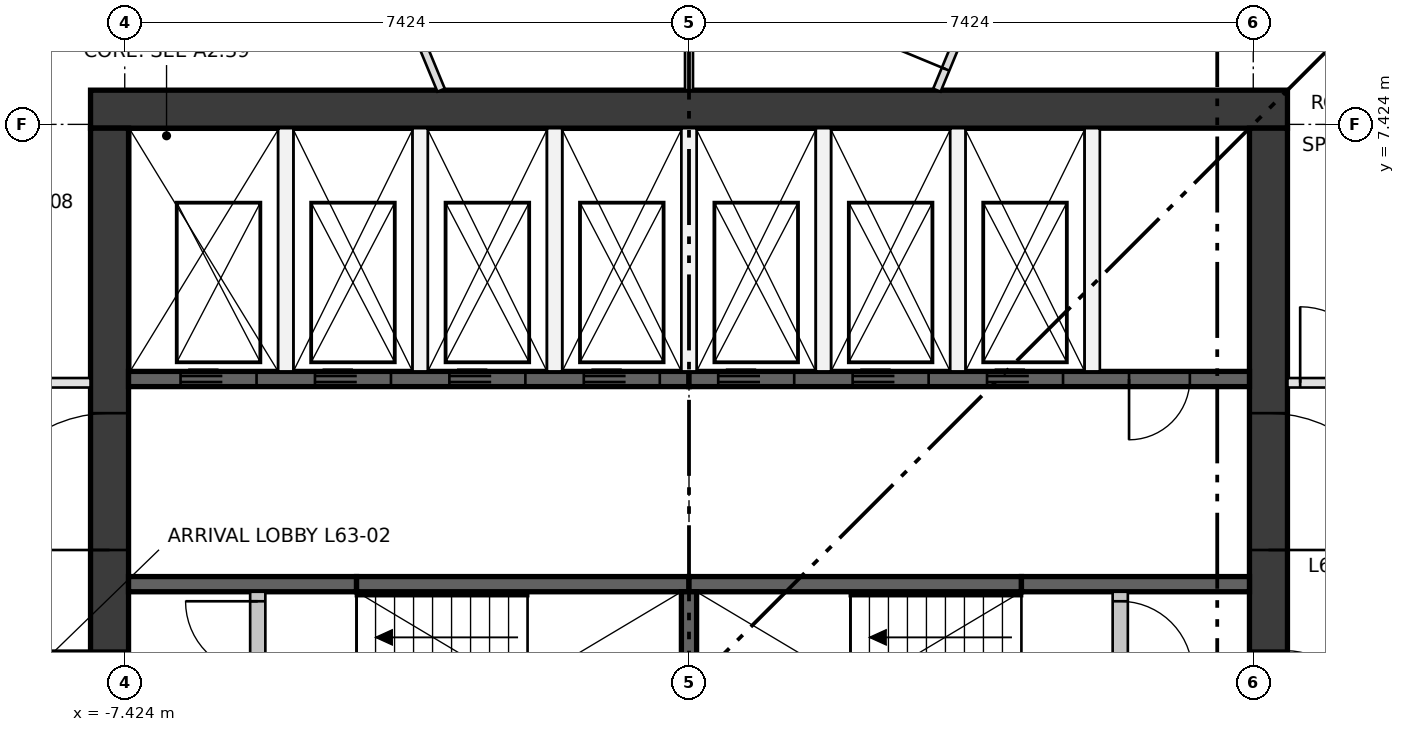
"""IFC4 building model, lengths in metres.
Left out: names, types, materials, properties, quantities, classifications, styles, units other than length and angle.
Written with IfcOpenShell. Run it as: python <this file> out.ifc"""

import sys

from ifc_helpers import new_model, si_unit, direction, frame, frame_2d, origin, place, context, subcontext, project, spatial, rectangle, extrude, element, fill, save


model = new_model("IFC4")
c1 = context("Model", 3, precision=1e-05, world=origin(), true_north=direction((0.0, 1.0)))
c2 = subcontext(c1, "Body", "Model", "MODEL_VIEW")
j1 = project(units=[si_unit("LENGTHUNIT", "METRE"), si_unit("PLANEANGLEUNIT", "RADIAN")], contexts=[c1])
p1 = place(None, origin())
s1 = spatial("IfcSite", under=j1, at=p1, CompositionType="ELEMENT")
p2 = place(p1, origin())
s2 = spatial("IfcBuilding", under=s1, at=p2, CompositionType="ELEMENT")
p3 = place(p2, frame((0.0, 0.0, 231.2)))
s3 = spatial("IfcBuildingStorey", under=s2, at=p3, CompositionType="ELEMENT", Elevation=231.2)
p4 = place(p3, frame((-7.874, 7.624, 0.0), z_axis=(0.0, 0.0, 1.0), x_axis=(1.0, 0.0, 0.0)))
e1 = element("IfcWall", 1, at=p4, inside=s3, PredefinedType="SHEAR", context=c2, shape_type="SweptSolid", body=[
    extrude(rectangle(XDim=15.748, YDim=0.5, at=frame_2d((7.874, 0.0))), origin(), (0.0, 0.0, 1.0), 3.3),
])
p5 = place(p3, frame((-7.624, -7.374, 0.0), z_axis=(0.0, 0.0, 1.0), x_axis=(0.0, 1.0, 0.0)))
e2 = element("IfcWall", 2, at=p5, inside=s3, PredefinedType="SHEAR", context=c2, shape_type="SweptSolid", body=[
    extrude(rectangle(XDim=14.748, YDim=0.5, at=frame_2d((7.374, 0.0))), origin(), (0.0, 0.0, 1.0), 3.3),
])
p6 = place(p5, frame((6.874, 0.0, 0.0)))
e3 = element("IfcOpeningElement", 3, at=p6, cuts=e2, PredefinedType="OPENING", context=c2, shape_type="SweptSolid", body=[
    extrude(rectangle(XDim=1.0, YDim=2.1, at=frame_2d((0.5, 1.05))), frame((0.0, 0.26, 0.0), z_axis=(0.0, -1.0, 0.0), x_axis=(1.0, 0.0, 0.0)), (0.0, 0.0, 1.0), 0.52),
])
p7 = place(p5, frame((3.75, 0.0, 0.0)))
e4 = element("IfcOpeningElement", 4, at=p7, cuts=e2, PredefinedType="OPENING", context=c2, shape_type="SweptSolid", body=[
    extrude(rectangle(XDim=1.8, YDim=2.1, at=frame_2d((0.9, 1.05))), frame((0.0, 0.26, 0.0), z_axis=(0.0, -1.0, 0.0), x_axis=(1.0, 0.0, 0.0)), (0.0, 0.0, 1.0), 0.52),
])
p8 = place(p5, frame((9.198, 0.0, 0.0)))
e5 = element("IfcOpeningElement", 5, at=p8, cuts=e2, PredefinedType="OPENING", context=c2, shape_type="SweptSolid", body=[
    extrude(rectangle(XDim=1.8, YDim=2.1, at=frame_2d((0.9, 1.05))), frame((0.0, 0.26, 0.0), z_axis=(0.0, -1.0, 0.0), x_axis=(1.0, 0.0, 0.0)), (0.0, 0.0, 1.0), 0.52),
])
p9 = place(p3, frame((7.624, -7.374, 0.0), z_axis=(0.0, 0.0, 1.0), x_axis=(0.0, 1.0, 0.0)))
e6 = element("IfcWall", 6, at=p9, inside=s3, PredefinedType="SHEAR", context=c2, shape_type="SweptSolid", body=[
    extrude(rectangle(XDim=14.748, YDim=0.5, at=frame_2d((7.374, 0.0))), origin(), (0.0, 0.0, 1.0), 3.3),
])
p10 = place(p9, frame((6.874, 0.0, 0.0)))
e7 = element("IfcOpeningElement", 7, at=p10, cuts=e6, PredefinedType="OPENING", context=c2, shape_type="SweptSolid", body=[
    extrude(rectangle(XDim=1.0, YDim=2.1, at=frame_2d((0.5, 1.05))), frame((0.0, 0.26, 0.0), z_axis=(0.0, -1.0, 0.0), x_axis=(1.0, 0.0, 0.0)), (0.0, 0.0, 1.0), 0.52),
])
p11 = place(p9, frame((3.75, 0.0, 0.0)))
e8 = element("IfcOpeningElement", 8, at=p11, cuts=e6, PredefinedType="OPENING", context=c2, shape_type="SweptSolid", body=[
    extrude(rectangle(XDim=1.8, YDim=2.1, at=frame_2d((0.9, 1.05))), frame((0.0, 0.26, 0.0), z_axis=(0.0, -1.0, 0.0), x_axis=(1.0, 0.0, 0.0)), (0.0, 0.0, 1.0), 0.52),
])
p12 = place(p9, frame((9.198, 0.0, 0.0)))
e9 = element("IfcOpeningElement", 9, at=p12, cuts=e6, PredefinedType="OPENING", context=c2, shape_type="SweptSolid", body=[
    extrude(rectangle(XDim=1.8, YDim=2.1, at=frame_2d((0.9, 1.05))), frame((0.0, 0.26, 0.0), z_axis=(0.0, -1.0, 0.0), x_axis=(1.0, 0.0, 0.0)), (0.0, 0.0, 1.0), 0.52),
])
p13 = place(p3, frame((-7.374, 4.074, 0.0), z_axis=(0.0, 0.0, 1.0), x_axis=(1.0, 0.0, 0.0)))
e10 = element("IfcWall", 10, at=p13, inside=s3, PredefinedType="SHEAR", context=c2, shape_type="SweptSolid", body=[
    extrude(rectangle(XDim=7.374, YDim=0.2, at=frame_2d((3.687, 0.0))), origin(), (0.0, 0.0, 1.0), 3.3),
])
p14 = place(p13, frame((0.684, 0.0, 0.0)))
e11 = element("IfcOpeningElement", 11, at=p14, cuts=e10, PredefinedType="OPENING", context=c2, shape_type="SweptSolid", body=[
    extrude(rectangle(XDim=1.0, YDim=2.1, at=frame_2d((0.5, 1.05))), frame((0.0, 0.11, 0.0), z_axis=(0.0, -1.0, 0.0), x_axis=(1.0, 0.0, 0.0)), (0.0, 0.0, 1.0), 0.22),
])
p15 = place(p13, frame((2.453, 0.0, 0.0)))
e12 = element("IfcOpeningElement", 12, at=p15, cuts=e10, PredefinedType="OPENING", context=c2, shape_type="SweptSolid", body=[
    extrude(rectangle(XDim=1.0, YDim=2.1, at=frame_2d((0.5, 1.05))), frame((0.0, 0.11, 0.0), z_axis=(0.0, -1.0, 0.0), x_axis=(1.0, 0.0, 0.0)), (0.0, 0.0, 1.0), 0.22),
])
p16 = place(p13, frame((4.221, 0.0, 0.0)))
e13 = element("IfcOpeningElement", 13, at=p16, cuts=e10, PredefinedType="OPENING", context=c2, shape_type="SweptSolid", body=[
    extrude(rectangle(XDim=1.0, YDim=2.1, at=frame_2d((0.5, 1.05))), frame((0.0, 0.11, 0.0), z_axis=(0.0, -1.0, 0.0), x_axis=(1.0, 0.0, 0.0)), (0.0, 0.0, 1.0), 0.22),
])
p17 = place(p13, frame((5.99, 0.0, 0.0)))
e14 = element("IfcOpeningElement", 14, at=p17, cuts=e10, PredefinedType="OPENING", context=c2, shape_type="SweptSolid", body=[
    extrude(rectangle(XDim=1.0, YDim=2.1, at=frame_2d((0.5, 1.05))), frame((0.0, 0.11, 0.0), z_axis=(0.0, -1.0, 0.0), x_axis=(1.0, 0.0, 0.0)), (0.0, 0.0, 1.0), 0.22),
])
p18 = place(p3, frame((0.0, 4.074, 0.0), z_axis=(0.0, 0.0, 1.0), x_axis=(1.0, 0.0, 0.0)))
e15 = element("IfcWall", 15, at=p18, inside=s3, PredefinedType="SHEAR", context=c2, shape_type="SweptSolid", body=[
    extrude(rectangle(XDim=7.374, YDim=0.2, at=frame_2d((3.687, 0.0))), origin(), (0.0, 0.0, 1.0), 3.3),
])
p19 = place(p18, frame((0.384, 0.0, 0.0)))
e16 = element("IfcOpeningElement", 16, at=p19, cuts=e15, PredefinedType="OPENING", context=c2, shape_type="SweptSolid", body=[
    extrude(rectangle(XDim=1.0, YDim=2.1, at=frame_2d((0.5, 1.05))), frame((0.0, 0.11, 0.0), z_axis=(0.0, -1.0, 0.0), x_axis=(1.0, 0.0, 0.0)), (0.0, 0.0, 1.0), 0.22),
])
p20 = place(p18, frame((2.153, 0.0, 0.0)))
e17 = element("IfcOpeningElement", 17, at=p20, cuts=e15, PredefinedType="OPENING", context=c2, shape_type="SweptSolid", body=[
    extrude(rectangle(XDim=1.0, YDim=2.1, at=frame_2d((0.5, 1.05))), frame((0.0, 0.11, 0.0), z_axis=(0.0, -1.0, 0.0), x_axis=(1.0, 0.0, 0.0)), (0.0, 0.0, 1.0), 0.22),
])
p21 = place(p18, frame((3.921, 0.0, 0.0)))
e18 = element("IfcOpeningElement", 18, at=p21, cuts=e15, PredefinedType="OPENING", context=c2, shape_type="SweptSolid", body=[
    extrude(rectangle(XDim=1.0, YDim=2.1, at=frame_2d((0.5, 1.05))), frame((0.0, 0.11, 0.0), z_axis=(0.0, -1.0, 0.0), x_axis=(1.0, 0.0, 0.0)), (0.0, 0.0, 1.0), 0.22),
])
p22 = place(p18, frame((5.79, 0.0, 0.0)))
e19 = element("IfcOpeningElement", 19, at=p22, cuts=e15, PredefinedType="OPENING", context=c2, shape_type="SweptSolid", body=[
    extrude(rectangle(XDim=0.8, YDim=2.1, at=frame_2d((0.4, 1.05))), frame((0.0, 0.11, 0.0), z_axis=(0.0, -1.0, 0.0), x_axis=(1.0, 0.0, 0.0)), (0.0, 0.0, 1.0), 0.22),
])
p23 = place(p3, frame((-7.374, 1.375, 0.0), z_axis=(0.0, 0.0, 1.0), x_axis=(1.0, 0.0, 0.0)))
e20 = element("IfcWall", 20, at=p23, inside=s3, PredefinedType="SHEAR", context=c2, shape_type="SweptSolid", body=[
    extrude(rectangle(XDim=3.0, YDim=0.2, at=frame_2d((1.5, 0.0))), origin(), (0.0, 0.0, 1.0), 3.3),
])
for number, where, z_axis, x_axis in (
    (21, (-4.374, 1.375, 0.0), (0.0, 0.0, 1.0), (1.0, 0.0, 0.0)),
    (22, (0.0, 1.375, 0.0), (0.0, 0.0, 1.0), (1.0, 0.0, 0.0)),
):
    element("IfcWall", number, at=place(p3, frame(where, z_axis=z_axis, x_axis=x_axis)), inside=s3, PredefinedType="SHEAR", context=c2, shape_type="SweptSolid", body=[
        extrude(rectangle(XDim=4.374, YDim=0.2, at=frame_2d((2.187, 0.0))), origin(), (0.0, 0.0, 1.0), 3.3),
    ])
p24 = place(p3, frame((4.374, 1.375, 0.0), z_axis=(0.0, 0.0, 1.0), x_axis=(1.0, 0.0, 0.0)))
e23 = element("IfcWall", 23, at=p24, inside=s3, PredefinedType="SHEAR", context=c2, shape_type="SweptSolid", body=[
    extrude(rectangle(XDim=3.0, YDim=0.2, at=frame_2d((1.5, 0.0))), origin(), (0.0, 0.0, 1.0), 3.3),
])
p25 = place(p3, frame((0.0, -1.275, 0.0), z_axis=(0.0, 0.0, 1.0), x_axis=(0.0, 1.0, 0.0)))
e24 = element("IfcWall", 24, at=p25, inside=s3, PredefinedType="SHEAR", context=c2, shape_type="SweptSolid", body=[
    extrude(rectangle(XDim=2.55, YDim=0.2, at=frame_2d((1.275, 0.0))), origin(), (0.0, 0.0, 1.0), 3.3),
])
for number, where, z_axis, x_axis in (
    (25, (-5.305, 4.174, 0.0), (0.0, 0.0, 1.0), (0.0, 1.0, 0.0)),
    (26, (-3.537, 4.174, 0.0), (0.0, 0.0, 1.0), (0.0, 1.0, 0.0)),
    (27, (-1.769, 4.174, 0.0), (0.0, 0.0, 1.0), (0.0, 1.0, 0.0)),
    (28, (0.0, 4.174, 0.0), (0.0, 0.0, 1.0), (0.0, 1.0, 0.0)),
    (29, (1.769, 4.174, 0.0), (0.0, 0.0, 1.0), (0.0, 1.0, 0.0)),
    (30, (3.537, 4.174, 0.0), (0.0, 0.0, 1.0), (0.0, 1.0, 0.0)),
    (31, (5.305, 4.174, 0.0), (0.0, 0.0, 1.0), (0.0, 1.0, 0.0)),
):
    element("IfcWall", number, at=place(p3, frame(where, z_axis=z_axis, x_axis=x_axis)), inside=s3, PredefinedType="PARTITIONING", context=c2, shape_type="SweptSolid", body=[
        extrude(rectangle(XDim=3.2, YDim=0.2, at=frame_2d((1.6, 0.0))), origin(), (0.0, 0.0, 1.0), 3.3),
    ])
p26 = place(p3, frame((-5.674, -1.275, 0.0), z_axis=(0.0, 0.0, 1.0), x_axis=(0.0, 1.0, 0.0)))
e32 = element("IfcWall", 32, at=p26, inside=s3, PredefinedType="PARTITIONING", context=c2, shape_type="SweptSolid", body=[
    extrude(rectangle(XDim=2.55, YDim=0.2, at=frame_2d((1.275, 0.0))), origin(), (0.0, 0.0, 1.0), 3.3),
])
p27 = place(p26, frame((0.125, 0.0, 0.0)))
e33 = element("IfcOpeningElement", 33, at=p27, cuts=e32, PredefinedType="OPENING", context=c2, shape_type="SweptSolid", body=[
    extrude(rectangle(XDim=0.95, YDim=2.1, at=frame_2d((0.475, 1.05))), frame((0.0, 0.11, 0.0), z_axis=(0.0, -1.0, 0.0), x_axis=(1.0, 0.0, 0.0)), (0.0, 0.0, 1.0), 0.22),
])
p28 = place(p26, frame((1.475, 0.0, 0.0)))
e34 = element("IfcOpeningElement", 34, at=p28, cuts=e32, PredefinedType="OPENING", context=c2, shape_type="SweptSolid", body=[
    extrude(rectangle(XDim=0.95, YDim=2.1, at=frame_2d((0.475, 1.05))), frame((0.0, 0.11, 0.0), z_axis=(0.0, -1.0, 0.0), x_axis=(1.0, 0.0, 0.0)), (0.0, 0.0, 1.0), 0.22),
])
p29 = place(p3, frame((5.674, -1.275, 0.0), z_axis=(0.0, 0.0, 1.0), x_axis=(0.0, 1.0, 0.0)))
e35 = element("IfcWall", 35, at=p29, inside=s3, PredefinedType="PARTITIONING", context=c2, shape_type="SweptSolid", body=[
    extrude(rectangle(XDim=2.55, YDim=0.2, at=frame_2d((1.275, 0.0))), origin(), (0.0, 0.0, 1.0), 3.3),
])
p30 = place(p29, frame((0.125, 0.0, 0.0)))
e36 = element("IfcOpeningElement", 36, at=p30, cuts=e35, PredefinedType="OPENING", context=c2, shape_type="SweptSolid", body=[
    extrude(rectangle(XDim=0.95, YDim=2.1, at=frame_2d((0.475, 1.05))), frame((0.0, 0.11, 0.0), z_axis=(0.0, -1.0, 0.0), x_axis=(1.0, 0.0, 0.0)), (0.0, 0.0, 1.0), 0.22),
])
p31 = place(p29, frame((1.475, 0.0, 0.0)))
e37 = element("IfcOpeningElement", 37, at=p31, cuts=e35, PredefinedType="OPENING", context=c2, shape_type="SweptSolid", body=[
    extrude(rectangle(XDim=0.95, YDim=2.1, at=frame_2d((0.475, 1.05))), frame((0.0, 0.11, 0.0), z_axis=(0.0, -1.0, 0.0), x_axis=(1.0, 0.0, 0.0)), (0.0, 0.0, 1.0), 0.22),
])
p32 = place(p3, frame((7.874, 4.024, 0.0), z_axis=(0.0, 0.0, 1.0), x_axis=(1.0, 0.0, 0.0)))
e38 = element("IfcWall", 38, at=p32, inside=s3, PredefinedType="PARTITIONING", context=c2, shape_type="SweptSolid", body=[
    extrude(rectangle(XDim=1.334, YDim=0.125, at=frame_2d((0.667, 0.0))), origin(), (0.0, 0.0, 1.0), 3.3),
])
p33 = place(p32, frame((0.167, 0.0, 0.0)))
e39 = element("IfcOpeningElement", 39, at=p33, cuts=e38, PredefinedType="OPENING", context=c2, shape_type="SweptSolid", body=[
    extrude(rectangle(XDim=1.0, YDim=2.1, at=frame_2d((0.5, 1.05))), frame((0.0, 0.073, 0.0), z_axis=(0.0, -1.0, 0.0), x_axis=(1.0, 0.0, 0.0)), (0.0, 0.0, 1.0), 0.145),
])
p34 = place(p3, frame((-8.983, 4.024, 0.0), z_axis=(0.0, 0.0, 1.0), x_axis=(1.0, 0.0, 0.0)))
e40 = element("IfcWall", 40, at=p34, inside=s3, PredefinedType="PARTITIONING", context=c2, shape_type="SweptSolid", body=[
    extrude(rectangle(XDim=1.109, YDim=0.125, at=frame_2d((0.554, 0.0))), origin(), (0.0, 0.0, 1.0), 3.3),
])
p35 = place(p3, frame((3.261, 7.874, 0.0), z_axis=(0.0, 0.0, 1.0), x_axis=(0.382683383062, 0.923879552933, 0.0)))
e41 = element("IfcWall", 41, at=p35, inside=s3, PredefinedType="PARTITIONING", context=c2, shape_type="SweptSolid", body=[
    extrude(rectangle(XDim=1.777, YDim=0.105, at=frame_2d((0.889, 0.0))), origin(), (0.0, 0.0, 1.0), 3.3),
])
p36 = place(p35, frame((0.3, 0.0, 0.0)))
e42 = element("IfcOpeningElement", 42, at=p36, cuts=e41, PredefinedType="OPENING", context=c2, shape_type="SweptSolid", body=[
    extrude(rectangle(XDim=1.0, YDim=2.1, at=frame_2d((0.5, 1.05))), frame((0.0, 0.062, 0.0), z_axis=(0.0, -1.0, 0.0), x_axis=(1.0, 0.0, 0.0)), (0.0, 0.0, 1.0), 0.125),
])
p37 = place(p3, frame((0.0, 7.874, 0.0), z_axis=(0.0, 0.0, 1.0), x_axis=(0.0, 1.0, 0.0)))
e43 = element("IfcWall", 43, at=p37, inside=s3, PredefinedType="PARTITIONING", context=c2, shape_type="SweptSolid", body=[
    extrude(rectangle(XDim=2.37, YDim=0.105, at=frame_2d((1.185, 0.0))), origin(), (0.0, 0.0, 1.0), 3.3),
])
p38 = place(p3, frame((-3.261, 7.874, 0.0), z_axis=(0.0, 0.0, 1.0), x_axis=(-0.382683383062, 0.923879552933, 0.0)))
e44 = element("IfcWall", 44, at=p38, inside=s3, PredefinedType="PARTITIONING", context=c2, shape_type="SweptSolid", body=[
    extrude(rectangle(XDim=1.777, YDim=0.105, at=frame_2d((0.889, 0.0))), origin(), (0.0, 0.0, 1.0), 3.3),
])
p39 = place(p14, frame((1.0, 0.0, 0.0), z_axis=(0.0, 0.0, 1.0), x_axis=(-1.0, 0.0, 0.0)))
e45 = element("IfcDoor", 45, at=p39, inside=s3, OperationType="DOUBLE_DOOR_SLIDING", PredefinedType="DOOR", context=c2, shape_type="SweptSolid", body=[
    extrude(rectangle(XDim=1.0, YDim=2.1, at=frame_2d((0.5, 1.05))), frame((0.0, 0.025, 0.0), z_axis=(0.0, -1.0, 0.0), x_axis=(1.0, 0.0, 0.0)), (0.0, 0.0, 1.0), 0.05),
])
fill(e11, e45)
p40 = place(p15, frame((1.0, 0.0, 0.0), z_axis=(0.0, 0.0, 1.0), x_axis=(-1.0, 0.0, 0.0)))
e46 = element("IfcDoor", 46, at=p40, inside=s3, OperationType="DOUBLE_DOOR_SLIDING", PredefinedType="DOOR", context=c2, shape_type="SweptSolid", body=[
    extrude(rectangle(XDim=1.0, YDim=2.1, at=frame_2d((0.5, 1.05))), frame((0.0, 0.025, 0.0), z_axis=(0.0, -1.0, 0.0), x_axis=(1.0, 0.0, 0.0)), (0.0, 0.0, 1.0), 0.05),
])
fill(e12, e46)
p41 = place(p16, frame((1.0, 0.0, 0.0), z_axis=(0.0, 0.0, 1.0), x_axis=(-1.0, 0.0, 0.0)))
e47 = element("IfcDoor", 47, at=p41, inside=s3, OperationType="DOUBLE_DOOR_SLIDING", PredefinedType="DOOR", context=c2, shape_type="SweptSolid", body=[
    extrude(rectangle(XDim=1.0, YDim=2.1, at=frame_2d((0.5, 1.05))), frame((0.0, 0.025, 0.0), z_axis=(0.0, -1.0, 0.0), x_axis=(1.0, 0.0, 0.0)), (0.0, 0.0, 1.0), 0.05),
])
fill(e13, e47)
p42 = place(p17, frame((1.0, 0.0, 0.0), z_axis=(0.0, 0.0, 1.0), x_axis=(-1.0, 0.0, 0.0)))
e48 = element("IfcDoor", 48, at=p42, inside=s3, OperationType="DOUBLE_DOOR_SLIDING", PredefinedType="DOOR", context=c2, shape_type="SweptSolid", body=[
    extrude(rectangle(XDim=1.0, YDim=2.1, at=frame_2d((0.5, 1.05))), frame((0.0, 0.025, 0.0), z_axis=(0.0, -1.0, 0.0), x_axis=(1.0, 0.0, 0.0)), (0.0, 0.0, 1.0), 0.05),
])
fill(e14, e48)
p43 = place(p19, frame((1.0, 0.0, 0.0), z_axis=(0.0, 0.0, 1.0), x_axis=(-1.0, 0.0, 0.0)))
e49 = element("IfcDoor", 49, at=p43, inside=s3, OperationType="DOUBLE_DOOR_SLIDING", PredefinedType="DOOR", context=c2, shape_type="SweptSolid", body=[
    extrude(rectangle(XDim=1.0, YDim=2.1, at=frame_2d((0.5, 1.05))), frame((0.0, 0.025, 0.0), z_axis=(0.0, -1.0, 0.0), x_axis=(1.0, 0.0, 0.0)), (0.0, 0.0, 1.0), 0.05),
])
fill(e16, e49)
p44 = place(p20, frame((1.0, 0.0, 0.0), z_axis=(0.0, 0.0, 1.0), x_axis=(-1.0, 0.0, 0.0)))
e50 = element("IfcDoor", 50, at=p44, inside=s3, OperationType="DOUBLE_DOOR_SLIDING", PredefinedType="DOOR", context=c2, shape_type="SweptSolid", body=[
    extrude(rectangle(XDim=1.0, YDim=2.1, at=frame_2d((0.5, 1.05))), frame((0.0, 0.025, 0.0), z_axis=(0.0, -1.0, 0.0), x_axis=(1.0, 0.0, 0.0)), (0.0, 0.0, 1.0), 0.05),
])
fill(e17, e50)
p45 = place(p21, frame((1.0, 0.0, 0.0), z_axis=(0.0, 0.0, 1.0), x_axis=(-1.0, 0.0, 0.0)))
e51 = element("IfcDoor", 51, at=p45, inside=s3, OperationType="DOUBLE_DOOR_SLIDING", PredefinedType="DOOR", context=c2, shape_type="SweptSolid", body=[
    extrude(rectangle(XDim=1.0, YDim=2.1, at=frame_2d((0.5, 1.05))), frame((0.0, 0.025, 0.0), z_axis=(0.0, -1.0, 0.0), x_axis=(1.0, 0.0, 0.0)), (0.0, 0.0, 1.0), 0.05),
])
fill(e18, e51)
p46 = place(p28, origin())
e52 = element("IfcDoor", 52, at=p46, inside=s3, OperationType="SINGLE_SWING_RIGHT", PredefinedType="DOOR", context=c2, shape_type="SweptSolid", body=[
    extrude(rectangle(XDim=0.95, YDim=2.1, at=frame_2d((0.475, 1.05))), frame((0.0, 0.025, 0.0), z_axis=(0.0, -1.0, 0.0), x_axis=(1.0, 0.0, 0.0)), (0.0, 0.0, 1.0), 0.05),
])
fill(e34, e52)
p47 = place(p31, frame((0.95, 0.0, 0.0), z_axis=(0.0, 0.0, 1.0), x_axis=(-1.0, 0.0, 0.0)))
e53 = element("IfcDoor", 53, at=p47, inside=s3, OperationType="SINGLE_SWING_LEFT", PredefinedType="DOOR", context=c2, shape_type="SweptSolid", body=[
    extrude(rectangle(XDim=0.95, YDim=2.1, at=frame_2d((0.475, 1.05))), frame((0.0, 0.025, 0.0), z_axis=(0.0, -1.0, 0.0), x_axis=(1.0, 0.0, 0.0)), (0.0, 0.0, 1.0), 0.05),
])
fill(e37, e53)
p48 = place(p22, frame((0.8, 0.0, 0.0), z_axis=(0.0, 0.0, 1.0), x_axis=(-1.0, 0.0, 0.0)))
e54 = element("IfcDoor", 54, at=p48, inside=s3, OperationType="SINGLE_SWING_LEFT", PredefinedType="DOOR", context=c2, shape_type="SweptSolid", body=[
    extrude(rectangle(XDim=0.8, YDim=2.1, at=frame_2d((0.4, 1.05))), frame((0.0, 0.025, 0.0), z_axis=(0.0, -1.0, 0.0), x_axis=(1.0, 0.0, 0.0)), (0.0, 0.0, 1.0), 0.05),
])
fill(e19, e54)
p49 = place(p6, origin())
e55 = element("IfcDoor", 55, at=p49, inside=s3, OperationType="SINGLE_SWING_RIGHT", PredefinedType="DOOR", context=c2, shape_type="SweptSolid", body=[
    extrude(rectangle(XDim=1.0, YDim=2.1, at=frame_2d((0.5, 1.05))), frame((0.0, 0.25, 0.0), z_axis=(0.0, -1.0, 0.0), x_axis=(1.0, 0.0, 0.0)), (0.0, 0.0, 1.0), 0.05),
])
fill(e3, e55)
p50 = place(p8, origin())
e56 = element("IfcDoor", 56, at=p50, inside=s3, OperationType="DOUBLE_DOOR_SINGLE_SWING", PredefinedType="DOOR", context=c2, shape_type="SweptSolid", body=[
    extrude(rectangle(XDim=1.8, YDim=2.1, at=frame_2d((0.9, 1.05))), frame((0.0, 0.025, 0.0), z_axis=(0.0, -1.0, 0.0), x_axis=(1.0, 0.0, 0.0)), (0.0, 0.0, 1.0), 0.05),
])
fill(e5, e56)
p51 = place(p10, frame((1.0, 0.0, 0.0), z_axis=(0.0, 0.0, 1.0), x_axis=(-1.0, 0.0, 0.0)))
e57 = element("IfcDoor", 57, at=p51, inside=s3, OperationType="SINGLE_SWING_LEFT", PredefinedType="DOOR", context=c2, shape_type="SweptSolid", body=[
    extrude(rectangle(XDim=1.0, YDim=2.1, at=frame_2d((0.5, 1.05))), frame((0.0, 0.25, 0.0), z_axis=(0.0, -1.0, 0.0), x_axis=(1.0, 0.0, 0.0)), (0.0, 0.0, 1.0), 0.05),
])
fill(e7, e57)
p52 = place(p12, frame((1.8, 0.0, 0.0), z_axis=(0.0, 0.0, 1.0), x_axis=(-1.0, 0.0, 0.0)))
e58 = element("IfcDoor", 58, at=p52, inside=s3, OperationType="DOUBLE_DOOR_SINGLE_SWING", PredefinedType="DOOR", context=c2, shape_type="SweptSolid", body=[
    extrude(rectangle(XDim=1.8, YDim=2.1, at=frame_2d((0.9, 1.05))), frame((0.0, 0.025, 0.0), z_axis=(0.0, -1.0, 0.0), x_axis=(1.0, 0.0, 0.0)), (0.0, 0.0, 1.0), 0.05),
])
fill(e9, e58)
p53 = place(p33, origin())
e59 = element("IfcDoor", 59, at=p53, inside=s3, OperationType="SINGLE_SWING_LEFT", PredefinedType="DOOR", context=c2, shape_type="SweptSolid", body=[
    extrude(rectangle(XDim=1.0, YDim=2.1, at=frame_2d((0.5, 1.05))), frame((0.0, 0.025, 0.0), z_axis=(0.0, -1.0, 0.0), x_axis=(1.0, 0.0, 0.0)), (0.0, 0.0, 1.0), 0.05),
])
fill(e39, e59)
p54 = place(p36, origin())
e60 = element("IfcDoor", 60, at=p54, inside=s3, OperationType="SINGLE_SWING_LEFT", PredefinedType="DOOR", context=c2, shape_type="SweptSolid", body=[
    extrude(rectangle(XDim=1.0, YDim=2.1, at=frame_2d((0.5, 1.05))), frame((0.0, 0.025, 0.0), z_axis=(0.0, -1.0, 0.0), x_axis=(1.0, 0.0, 0.0)), (0.0, 0.0, 1.0), 0.05),
])
fill(e42, e60)
save(model, sys.argv[1])
